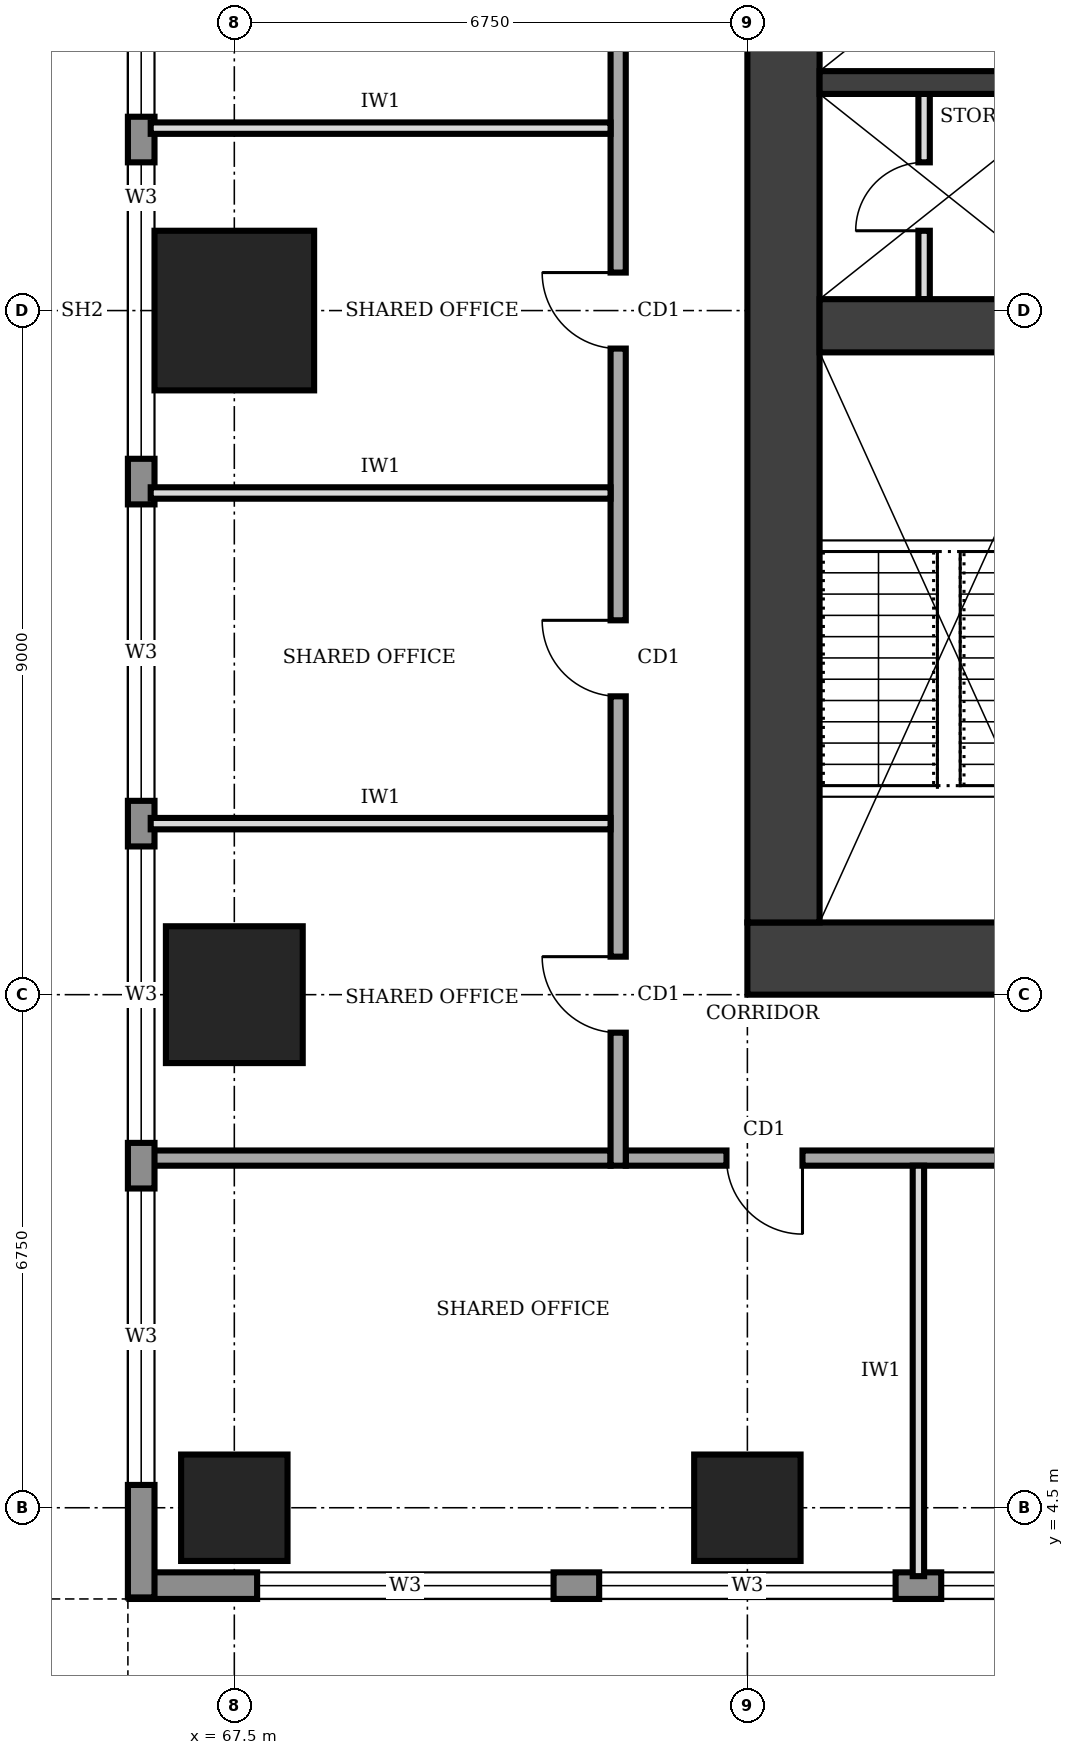
"""IFC4 building model, lengths in metres.
Left out: names, types, materials, properties, quantities, classifications, styles, units other than length and angle.
Written with IfcOpenShell. Run it as: python <this file> out.ifc"""

import sys

from ifc_helpers import new_model, si_unit, direction, frame, frame_2d, origin, origin_2d, place, context, subcontext, project, spatial, rectangle, extrude, element, fill, save


model = new_model("IFC4")
c1 = context("Model", 3, precision=1e-05, world=origin(), true_north=direction((0.0, 1.0)))
c2 = subcontext(c1, "Body", "Model", "MODEL_VIEW")
j1 = project(units=[si_unit("LENGTHUNIT", "METRE"), si_unit("PLANEANGLEUNIT", "RADIAN")], contexts=[c1])
p1 = place(None, origin())
s1 = spatial("IfcSite", under=j1, at=p1, CompositionType="ELEMENT")
p2 = place(p1, origin())
s2 = spatial("IfcBuilding", under=s1, at=p2, CompositionType="ELEMENT")
p3 = place(p2, frame((0.0, 0.0, 177.0)))
s3 = spatial("IfcBuildingStorey", under=s2, at=p3, CompositionType="ELEMENT", Elevation=177.0)
p4 = place(p3, frame((74.25, 11.725, 0.0), z_axis=(0.0, 0.0, 1.0), x_axis=(1.0, 0.0, 0.0)))
e1 = element("IfcWall", 1, at=p4, inside=s3, PredefinedType="SHEAR", context=c2, shape_type="SweptSolid", body=[
    extrude(rectangle(XDim=13.5, YDim=0.95, at=frame_2d((6.75, 0.0))), origin(), (0.0, 0.0, 1.0), 4.0),
])
p5 = place(p4, frame((4.75, 0.0, 0.0)))
e2 = element("IfcOpeningElement", 2, at=p5, cuts=e1, PredefinedType="OPENING", context=c2, shape_type="SweptSolid", body=[
    extrude(rectangle(XDim=1.0, YDim=2.1, at=frame_2d((0.5, 1.05))), frame((0.0, 0.485, 0.0), z_axis=(0.0, -1.0, 0.0), x_axis=(1.0, 0.0, 0.0)), (0.0, 0.0, 1.0), 0.97),
])
p6 = place(p3, frame((74.725, 28.3, 0.0), z_axis=(0.0, 0.0, 1.0), x_axis=(0.0, -1.0, 0.0)))
e3 = element("IfcWall", 3, at=p6, inside=s3, PredefinedType="SHEAR", context=c2, shape_type="SweptSolid", body=[
    extrude(rectangle(XDim=16.1, YDim=0.95, at=frame_2d((8.05, 0.0))), origin(), (0.0, 0.0, 1.0), 4.0),
])
p7 = place(p3, frame((75.2, 20.05, 0.0), z_axis=(0.0, 0.0, 1.0), x_axis=(1.0, 0.0, 0.0)))
e4 = element("IfcWall", 4, at=p7, inside=s3, PredefinedType="SHEAR", context=c2, shape_type="SweptSolid", body=[
    extrude(rectangle(XDim=3.4, YDim=0.7, at=frame_2d((1.7, 0.0))), origin(), (0.0, 0.0, 1.0), 4.0),
])
p8 = place(p3, frame((75.2, 23.25, 0.0), z_axis=(0.0, 0.0, 1.0), x_axis=(1.0, 0.0, 0.0)))
e5 = element("IfcWall", 5, at=p8, inside=s3, PredefinedType="SHEAR", context=c2, shape_type="SweptSolid", body=[
    extrude(rectangle(XDim=3.4, YDim=0.3, at=frame_2d((1.7, 0.0))), origin(), (0.0, 0.0, 1.0), 4.0),
])
for number, where, z_axis, x_axis in (
    (6, (67.5, 4.5, 0.0), (0.0, 0.0, 1.0), (1.0, 0.0, 0.0)),
    (7, (74.25, 4.5, 0.0), (0.0, 0.0, 1.0), (1.0, 0.0, 0.0)),
):
    element("IfcColumn", number, at=place(p3, frame(where, z_axis=z_axis, x_axis=x_axis)), inside=s3, PredefinedType="COLUMN", context=c2, shape_type="SweptSolid", body=[
        extrude(rectangle(XDim=1.4, YDim=1.4, at=origin_2d()), origin(), (0.0, 0.0, 1.0), 4.0),
    ])
p9 = place(p3, frame((67.5, 11.25, 0.0), z_axis=(0.0, 0.0, 1.0), x_axis=(1.0, 0.0, 0.0)))
e8 = element("IfcColumn", 8, at=p9, inside=s3, PredefinedType="COLUMN", context=c2, shape_type="SweptSolid", body=[
    extrude(rectangle(XDim=1.8, YDim=1.8, at=origin_2d()), origin(), (0.0, 0.0, 1.0), 4.0),
])
p10 = place(p3, frame((67.5, 20.25, 0.0), z_axis=(0.0, 0.0, 1.0), x_axis=(1.0, 0.0, 0.0)))
e9 = element("IfcColumn", 9, at=p10, inside=s3, PredefinedType="COLUMN", context=c2, shape_type="SweptSolid", body=[
    extrude(rectangle(XDim=2.1, YDim=2.1, at=origin_2d()), origin(), (0.0, 0.0, 1.0), 4.0),
])
p11 = place(p3, frame((66.12, 3.475, 0.0), z_axis=(0.0, 0.0, 1.0), x_axis=(1.0, 0.0, 0.0)))
e10 = element("IfcWall", 10, at=p11, inside=s3, PredefinedType="STANDARD", context=c2, shape_type="SweptSolid", body=[
    extrude(rectangle(XDim=29.91, YDim=0.35, at=frame_2d((14.955, 0.0))), origin(), (0.0, 0.0, 1.0), 3.75),
])
p12 = place(p11, frame((1.68, 0.0, 0.95)))
e11 = element("IfcOpeningElement", 11, at=p12, cuts=e10, PredefinedType="OPENING", context=c2, shape_type="SweptSolid", body=[
    extrude(rectangle(XDim=3.9, YDim=1.8, at=frame_2d((1.95, 0.9))), frame((0.0, 0.185, 0.0), z_axis=(0.0, -1.0, 0.0), x_axis=(1.0, 0.0, 0.0)), (0.0, 0.0, 1.0), 0.37),
])
p13 = place(p11, frame((6.18, 0.0, 0.95)))
e12 = element("IfcOpeningElement", 12, at=p13, cuts=e10, PredefinedType="OPENING", context=c2, shape_type="SweptSolid", body=[
    extrude(rectangle(XDim=3.9, YDim=1.8, at=frame_2d((1.95, 0.9))), frame((0.0, 0.185, 0.0), z_axis=(0.0, -1.0, 0.0), x_axis=(1.0, 0.0, 0.0)), (0.0, 0.0, 1.0), 0.37),
])
p14 = place(p11, frame((10.68, 0.0, 0.95)))
e13 = element("IfcOpeningElement", 13, at=p14, cuts=e10, PredefinedType="OPENING", context=c2, shape_type="SweptSolid", body=[
    extrude(rectangle(XDim=3.9, YDim=1.8, at=frame_2d((1.95, 0.9))), frame((0.0, 0.185, 0.0), z_axis=(0.0, -1.0, 0.0), x_axis=(1.0, 0.0, 0.0)), (0.0, 0.0, 1.0), 0.37),
])
p15 = place(p11, frame((15.18, 0.0, 0.95)))
e14 = element("IfcOpeningElement", 14, at=p15, cuts=e10, PredefinedType="OPENING", context=c2, shape_type="SweptSolid", body=[
    extrude(rectangle(XDim=3.9, YDim=1.8, at=frame_2d((1.95, 0.9))), frame((0.0, 0.185, 0.0), z_axis=(0.0, -1.0, 0.0), x_axis=(1.0, 0.0, 0.0)), (0.0, 0.0, 1.0), 0.37),
])
p16 = place(p11, frame((19.68, 0.0, 0.95)))
e15 = element("IfcOpeningElement", 15, at=p16, cuts=e10, PredefinedType="OPENING", context=c2, shape_type="SweptSolid", body=[
    extrude(rectangle(XDim=3.9, YDim=1.8, at=frame_2d((1.95, 0.9))), frame((0.0, 0.185, 0.0), z_axis=(0.0, -1.0, 0.0), x_axis=(1.0, 0.0, 0.0)), (0.0, 0.0, 1.0), 0.37),
])
p17 = place(p11, frame((24.18, 0.0, 0.95)))
e16 = element("IfcOpeningElement", 16, at=p17, cuts=e10, PredefinedType="OPENING", context=c2, shape_type="SweptSolid", body=[
    extrude(rectangle(XDim=3.9, YDim=1.8, at=frame_2d((1.95, 0.9))), frame((0.0, 0.185, 0.0), z_axis=(0.0, -1.0, 0.0), x_axis=(1.0, 0.0, 0.0)), (0.0, 0.0, 1.0), 0.37),
])
p18 = place(p3, frame((66.275, 37.18, 0.0), z_axis=(0.0, 0.0, 1.0), x_axis=(0.0, -1.0, 0.0)))
e17 = element("IfcWall", 17, at=p18, inside=s3, PredefinedType="STANDARD", context=c2, shape_type="SweptSolid", body=[
    extrude(rectangle(XDim=33.86, YDim=0.35, at=frame_2d((16.93, 0.0))), origin(), (0.0, 0.0, 1.0), 3.75),
])
p19 = place(p18, frame((28.48, 0.0, 0.95)))
e18 = element("IfcOpeningElement", 18, at=p19, cuts=e17, PredefinedType="OPENING", context=c2, shape_type="SweptSolid", body=[
    extrude(rectangle(XDim=3.9, YDim=1.8, at=frame_2d((1.95, 0.9))), frame((0.0, 0.185, 0.0), z_axis=(0.0, -1.0, 0.0), x_axis=(1.0, 0.0, 0.0)), (0.0, 0.0, 1.0), 0.37),
])
p20 = place(p18, frame((23.98, 0.0, 0.95)))
e19 = element("IfcOpeningElement", 19, at=p20, cuts=e17, PredefinedType="OPENING", context=c2, shape_type="SweptSolid", body=[
    extrude(rectangle(XDim=3.9, YDim=1.8, at=frame_2d((1.95, 0.9))), frame((0.0, 0.185, 0.0), z_axis=(0.0, -1.0, 0.0), x_axis=(1.0, 0.0, 0.0)), (0.0, 0.0, 1.0), 0.37),
])
p21 = place(p18, frame((19.48, 0.0, 0.95)))
e20 = element("IfcOpeningElement", 20, at=p21, cuts=e17, PredefinedType="OPENING", context=c2, shape_type="SweptSolid", body=[
    extrude(rectangle(XDim=3.9, YDim=1.8, at=frame_2d((1.95, 0.9))), frame((0.0, 0.185, 0.0), z_axis=(0.0, -1.0, 0.0), x_axis=(1.0, 0.0, 0.0)), (0.0, 0.0, 1.0), 0.37),
])
p22 = place(p18, frame((14.98, 0.0, 0.95)))
e21 = element("IfcOpeningElement", 21, at=p22, cuts=e17, PredefinedType="OPENING", context=c2, shape_type="SweptSolid", body=[
    extrude(rectangle(XDim=3.9, YDim=1.8, at=frame_2d((1.95, 0.9))), frame((0.0, 0.185, 0.0), z_axis=(0.0, -1.0, 0.0), x_axis=(1.0, 0.0, 0.0)), (0.0, 0.0, 1.0), 0.37),
])
p23 = place(p18, frame((10.48, 0.0, 0.95)))
e22 = element("IfcOpeningElement", 22, at=p23, cuts=e17, PredefinedType="OPENING", context=c2, shape_type="SweptSolid", body=[
    extrude(rectangle(XDim=3.9, YDim=1.8, at=frame_2d((1.95, 0.9))), frame((0.0, 0.185, 0.0), z_axis=(0.0, -1.0, 0.0), x_axis=(1.0, 0.0, 0.0)), (0.0, 0.0, 1.0), 0.37),
])
p24 = place(p18, frame((5.98, 0.0, 0.95)))
e23 = element("IfcOpeningElement", 23, at=p24, cuts=e17, PredefinedType="OPENING", context=c2, shape_type="SweptSolid", body=[
    extrude(rectangle(XDim=3.9, YDim=1.8, at=frame_2d((1.95, 0.9))), frame((0.0, 0.185, 0.0), z_axis=(0.0, -1.0, 0.0), x_axis=(1.0, 0.0, 0.0)), (0.0, 0.0, 1.0), 0.37),
])
p25 = place(p18, frame((1.48, 0.0, 0.95)))
e24 = element("IfcOpeningElement", 24, at=p25, cuts=e17, PredefinedType="OPENING", context=c2, shape_type="SweptSolid", body=[
    extrude(rectangle(XDim=3.9, YDim=1.8, at=frame_2d((1.95, 0.9))), frame((0.0, 0.185, 0.0), z_axis=(0.0, -1.0, 0.0), x_axis=(1.0, 0.0, 0.0)), (0.0, 0.0, 1.0), 0.37),
])
p26 = place(p3, frame((76.575, 20.4, 0.0), z_axis=(0.0, 0.0, 1.0), x_axis=(0.0, 1.0, 0.0)))
e25 = element("IfcWall", 25, at=p26, inside=s3, PredefinedType="PARTITIONING", context=c2, shape_type="SweptSolid", body=[
    extrude(rectangle(XDim=2.7, YDim=0.15, at=frame_2d((1.35, 0.0))), origin(), (0.0, 0.0, 1.0), 3.75),
])
p27 = place(p26, frame((0.9, 0.0, 0.0)))
e26 = element("IfcOpeningElement", 26, at=p27, cuts=e25, PredefinedType="OPENING", context=c2, shape_type="SweptSolid", body=[
    extrude(rectangle(XDim=0.9, YDim=2.1, at=frame_2d((0.45, 1.05))), frame((0.0, 0.085, 0.0), z_axis=(0.0, -1.0, 0.0), x_axis=(1.0, 0.0, 0.0)), (0.0, 0.0, 1.0), 0.17),
])
p28 = place(p3, frame((72.65, 9.1, 0.0), z_axis=(0.0, 0.0, 1.0), x_axis=(1.0, 0.0, 0.0)))
e27 = element("IfcWall", 27, at=p28, inside=s3, PredefinedType="SOLIDWALL", context=c2, shape_type="SweptSolid", body=[
    extrude(rectangle(XDim=16.9, YDim=0.2, at=frame_2d((8.45, 0.0))), origin(), (0.0, 0.0, 1.0), 3.75),
])
p29 = place(p28, frame((1.325, 0.0, 0.0)))
e28 = element("IfcOpeningElement", 28, at=p29, cuts=e27, PredefinedType="OPENING", context=c2, shape_type="SweptSolid", body=[
    extrude(rectangle(XDim=1.0, YDim=2.1, at=frame_2d((0.5, 1.05))), frame((0.0, 0.11, 0.0), z_axis=(0.0, -1.0, 0.0), x_axis=(1.0, 0.0, 0.0)), (0.0, 0.0, 1.0), 0.22),
])
p30 = place(p28, frame((9.475, 0.0, 0.0)))
e29 = element("IfcOpeningElement", 29, at=p30, cuts=e27, PredefinedType="OPENING", context=c2, shape_type="SweptSolid", body=[
    extrude(rectangle(XDim=1.8, YDim=2.1, at=frame_2d((0.9, 1.05))), frame((0.0, 0.11, 0.0), z_axis=(0.0, -1.0, 0.0), x_axis=(1.0, 0.0, 0.0)), (0.0, 0.0, 1.0), 0.22),
])
p31 = place(p3, frame((72.55, 32.05, 0.0), z_axis=(0.0, 0.0, 1.0), x_axis=(0.0, -1.0, 0.0)))
e30 = element("IfcWall", 30, at=p31, inside=s3, PredefinedType="SOLIDWALL", context=c2, shape_type="SweptSolid", body=[
    extrude(rectangle(XDim=23.05, YDim=0.2, at=frame_2d((11.525, 0.0))), origin(), (0.0, 0.0, 1.0), 3.75),
])
p32 = place(p31, frame((20.3, 0.0, 0.0)))
e31 = element("IfcOpeningElement", 31, at=p32, cuts=e30, PredefinedType="OPENING", context=c2, shape_type="SweptSolid", body=[
    extrude(rectangle(XDim=1.0, YDim=2.1, at=frame_2d((0.5, 1.05))), frame((0.0, 0.11, 0.0), z_axis=(0.0, -1.0, 0.0), x_axis=(1.0, 0.0, 0.0)), (0.0, 0.0, 1.0), 0.22),
])
p33 = place(p31, frame((15.875, 0.0, 0.0)))
e32 = element("IfcOpeningElement", 32, at=p33, cuts=e30, PredefinedType="OPENING", context=c2, shape_type="SweptSolid", body=[
    extrude(rectangle(XDim=1.0, YDim=2.1, at=frame_2d((0.5, 1.05))), frame((0.0, 0.11, 0.0), z_axis=(0.0, -1.0, 0.0), x_axis=(1.0, 0.0, 0.0)), (0.0, 0.0, 1.0), 0.22),
])
p34 = place(p31, frame((11.3, 0.0, 0.0)))
e33 = element("IfcOpeningElement", 33, at=p34, cuts=e30, PredefinedType="OPENING", context=c2, shape_type="SweptSolid", body=[
    extrude(rectangle(XDim=1.0, YDim=2.1, at=frame_2d((0.5, 1.05))), frame((0.0, 0.11, 0.0), z_axis=(0.0, -1.0, 0.0), x_axis=(1.0, 0.0, 0.0)), (0.0, 0.0, 1.0), 0.22),
])
p35 = place(p31, frame((6.725, 0.0, 0.0)))
e34 = element("IfcOpeningElement", 34, at=p35, cuts=e30, PredefinedType="OPENING", context=c2, shape_type="SweptSolid", body=[
    extrude(rectangle(XDim=1.0, YDim=2.1, at=frame_2d((0.5, 1.05))), frame((0.0, 0.11, 0.0), z_axis=(0.0, -1.0, 0.0), x_axis=(1.0, 0.0, 0.0)), (0.0, 0.0, 1.0), 0.22),
])
p36 = place(p31, frame((1.925, 0.0, 0.0)))
e35 = element("IfcOpeningElement", 35, at=p36, cuts=e30, PredefinedType="OPENING", context=c2, shape_type="SweptSolid", body=[
    extrude(rectangle(XDim=1.0, YDim=2.1, at=frame_2d((0.5, 1.05))), frame((0.0, 0.11, 0.0), z_axis=(0.0, -1.0, 0.0), x_axis=(1.0, 0.0, 0.0)), (0.0, 0.0, 1.0), 0.22),
])
p37 = place(p3, frame((66.4, 9.1, 0.0), z_axis=(0.0, 0.0, 1.0), x_axis=(1.0, 0.0, 0.0)))
e36 = element("IfcWall", 36, at=p37, inside=s3, PredefinedType="SOLIDWALL", context=c2, shape_type="SweptSolid", body=[
    extrude(rectangle(XDim=6.05, YDim=0.2, at=frame_2d((3.025, 0.0))), origin(), (0.0, 0.0, 1.0), 3.75),
])
p38 = place(p3, frame((76.5, 3.6, 0.0), z_axis=(0.0, 0.0, 1.0), x_axis=(0.0, 1.0, 0.0)))
e37 = element("IfcWall", 37, at=p38, inside=s3, PredefinedType="PARTITIONING", context=c2, shape_type="SweptSolid", body=[
    extrude(rectangle(XDim=5.4, YDim=0.15, at=frame_2d((2.7, 0.0))), origin(), (0.0, 0.0, 1.0), 3.75),
])
for number, where, z_axis, x_axis in (
    (38, (66.4, 13.5, 0.0), (0.0, 0.0, 1.0), (1.0, 0.0, 0.0)),
    (39, (66.4, 17.85, 0.0), (0.0, 0.0, 1.0), (1.0, 0.0, 0.0)),
    (40, (66.4, 22.65, 0.0), (0.0, 0.0, 1.0), (1.0, 0.0, 0.0)),
):
    element("IfcWall", number, at=place(p3, frame(where, z_axis=z_axis, x_axis=x_axis)), inside=s3, PredefinedType="PARTITIONING", context=c2, shape_type="SweptSolid", body=[
        extrude(rectangle(XDim=6.05, YDim=0.15, at=frame_2d((3.025, 0.0))), origin(), (0.0, 0.0, 1.0), 3.75),
    ])
p39 = place(p12, origin())
e41 = element("IfcWindow", 41, at=p39, inside=s3, PartitioningType="SINGLE_PANEL", PredefinedType="WINDOW", context=c2, shape_type="SweptSolid", body=[
    extrude(rectangle(XDim=3.9, YDim=1.8, at=frame_2d((1.95, 0.9))), frame((0.0, 0.03, 0.0), z_axis=(0.0, -1.0, 0.0), x_axis=(1.0, 0.0, 0.0)), (0.0, 0.0, 1.0), 0.06),
])
fill(e11, e41)
p40 = place(p13, origin())
e42 = element("IfcWindow", 42, at=p40, inside=s3, PartitioningType="SINGLE_PANEL", PredefinedType="WINDOW", context=c2, shape_type="SweptSolid", body=[
    extrude(rectangle(XDim=3.9, YDim=1.8, at=frame_2d((1.95, 0.9))), frame((0.0, 0.03, 0.0), z_axis=(0.0, -1.0, 0.0), x_axis=(1.0, 0.0, 0.0)), (0.0, 0.0, 1.0), 0.06),
])
fill(e12, e42)
p41 = place(p14, origin())
e43 = element("IfcWindow", 43, at=p41, inside=s3, PartitioningType="SINGLE_PANEL", PredefinedType="WINDOW", context=c2, shape_type="SweptSolid", body=[
    extrude(rectangle(XDim=3.9, YDim=1.8, at=frame_2d((1.95, 0.9))), frame((0.0, 0.03, 0.0), z_axis=(0.0, -1.0, 0.0), x_axis=(1.0, 0.0, 0.0)), (0.0, 0.0, 1.0), 0.06),
])
fill(e13, e43)
p42 = place(p19, origin())
e44 = element("IfcWindow", 44, at=p42, inside=s3, PartitioningType="SINGLE_PANEL", PredefinedType="WINDOW", context=c2, shape_type="SweptSolid", body=[
    extrude(rectangle(XDim=3.9, YDim=1.8, at=frame_2d((1.95, 0.9))), frame((0.0, 0.03, 0.0), z_axis=(0.0, -1.0, 0.0), x_axis=(1.0, 0.0, 0.0)), (0.0, 0.0, 1.0), 0.06),
])
fill(e18, e44)
p43 = place(p20, origin())
e45 = element("IfcWindow", 45, at=p43, inside=s3, PartitioningType="SINGLE_PANEL", PredefinedType="WINDOW", context=c2, shape_type="SweptSolid", body=[
    extrude(rectangle(XDim=3.9, YDim=1.8, at=frame_2d((1.95, 0.9))), frame((0.0, 0.03, 0.0), z_axis=(0.0, -1.0, 0.0), x_axis=(1.0, 0.0, 0.0)), (0.0, 0.0, 1.0), 0.06),
])
fill(e19, e45)
p44 = place(p21, origin())
e46 = element("IfcWindow", 46, at=p44, inside=s3, PartitioningType="SINGLE_PANEL", PredefinedType="WINDOW", context=c2, shape_type="SweptSolid", body=[
    extrude(rectangle(XDim=3.9, YDim=1.8, at=frame_2d((1.95, 0.9))), frame((0.0, 0.03, 0.0), z_axis=(0.0, -1.0, 0.0), x_axis=(1.0, 0.0, 0.0)), (0.0, 0.0, 1.0), 0.06),
])
fill(e20, e46)
p45 = place(p22, origin())
e47 = element("IfcWindow", 47, at=p45, inside=s3, PartitioningType="SINGLE_PANEL", PredefinedType="WINDOW", context=c2, shape_type="SweptSolid", body=[
    extrude(rectangle(XDim=3.9, YDim=1.8, at=frame_2d((1.95, 0.9))), frame((0.0, 0.03, 0.0), z_axis=(0.0, -1.0, 0.0), x_axis=(1.0, 0.0, 0.0)), (0.0, 0.0, 1.0), 0.06),
])
fill(e21, e47)
p46 = place(p23, origin())
e48 = element("IfcWindow", 48, at=p46, inside=s3, PartitioningType="SINGLE_PANEL", PredefinedType="WINDOW", context=c2, shape_type="SweptSolid", body=[
    extrude(rectangle(XDim=3.9, YDim=1.8, at=frame_2d((1.95, 0.9))), frame((0.0, 0.03, 0.0), z_axis=(0.0, -1.0, 0.0), x_axis=(1.0, 0.0, 0.0)), (0.0, 0.0, 1.0), 0.06),
])
fill(e22, e48)
p47 = place(p27, origin())
e49 = element("IfcDoor", 49, at=p47, inside=s3, OperationType="SINGLE_SWING_LEFT", PredefinedType="DOOR", context=c2, shape_type="SweptSolid", body=[
    extrude(rectangle(XDim=0.9, YDim=2.1, at=frame_2d((0.45, 1.05))), frame((0.0, 0.025, 0.0), z_axis=(0.0, -1.0, 0.0), x_axis=(1.0, 0.0, 0.0)), (0.0, 0.0, 1.0), 0.05),
])
fill(e26, e49)
p48 = place(p29, frame((1.0, 0.0, 0.0), z_axis=(0.0, 0.0, 1.0), x_axis=(-1.0, 0.0, 0.0)))
e50 = element("IfcDoor", 50, at=p48, inside=s3, OperationType="SINGLE_SWING_LEFT", PredefinedType="DOOR", context=c2, shape_type="SweptSolid", body=[
    extrude(rectangle(XDim=1.0, YDim=2.1, at=frame_2d((0.5, 1.05))), frame((0.0, 0.025, 0.0), z_axis=(0.0, -1.0, 0.0), x_axis=(1.0, 0.0, 0.0)), (0.0, 0.0, 1.0), 0.05),
])
fill(e28, e50)
p49 = place(p32, frame((1.0, 0.0, 0.0), z_axis=(0.0, 0.0, 1.0), x_axis=(-1.0, 0.0, 0.0)))
e51 = element("IfcDoor", 51, at=p49, inside=s3, OperationType="SINGLE_SWING_RIGHT", PredefinedType="DOOR", context=c2, shape_type="SweptSolid", body=[
    extrude(rectangle(XDim=1.0, YDim=2.1, at=frame_2d((0.5, 1.05))), frame((0.0, 0.025, 0.0), z_axis=(0.0, -1.0, 0.0), x_axis=(1.0, 0.0, 0.0)), (0.0, 0.0, 1.0), 0.05),
])
fill(e31, e51)
p50 = place(p33, frame((1.0, 0.0, 0.0), z_axis=(0.0, 0.0, 1.0), x_axis=(-1.0, 0.0, 0.0)))
e52 = element("IfcDoor", 52, at=p50, inside=s3, OperationType="SINGLE_SWING_RIGHT", PredefinedType="DOOR", context=c2, shape_type="SweptSolid", body=[
    extrude(rectangle(XDim=1.0, YDim=2.1, at=frame_2d((0.5, 1.05))), frame((0.0, 0.025, 0.0), z_axis=(0.0, -1.0, 0.0), x_axis=(1.0, 0.0, 0.0)), (0.0, 0.0, 1.0), 0.05),
])
fill(e32, e52)
p51 = place(p34, frame((1.0, 0.0, 0.0), z_axis=(0.0, 0.0, 1.0), x_axis=(-1.0, 0.0, 0.0)))
e53 = element("IfcDoor", 53, at=p51, inside=s3, OperationType="SINGLE_SWING_RIGHT", PredefinedType="DOOR", context=c2, shape_type="SweptSolid", body=[
    extrude(rectangle(XDim=1.0, YDim=2.1, at=frame_2d((0.5, 1.05))), frame((0.0, 0.025, 0.0), z_axis=(0.0, -1.0, 0.0), x_axis=(1.0, 0.0, 0.0)), (0.0, 0.0, 1.0), 0.05),
])
fill(e33, e53)
save(model, sys.argv[1])
